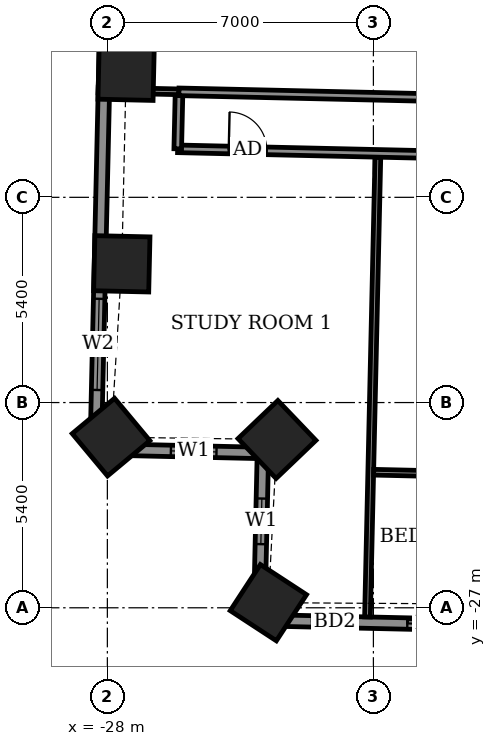
"""IFC4 building model, lengths in metres.
Left out: names, types, materials, properties, quantities, classifications, styles, units other than length and angle.
Written with IfcOpenShell. Run it as: python <this file> out.ifc"""

import sys

from ifc_helpers import new_model, si_unit, direction, frame, frame_2d, origin, origin_2d, place, context, subcontext, project, spatial, rectangle, extrude, element, fill, save


model = new_model("IFC4")
c1 = context("Model", 3, precision=1e-05, world=origin(), true_north=direction((0.0, 1.0)))
c2 = subcontext(c1, "Body", "Model", "MODEL_VIEW")
j1 = project(units=[si_unit("LENGTHUNIT", "METRE"), si_unit("PLANEANGLEUNIT", "RADIAN")], contexts=[c1])
p1 = place(None, origin())
s1 = spatial("IfcSite", under=j1, at=p1, CompositionType="ELEMENT")
p2 = place(p1, origin())
s2 = spatial("IfcBuilding", under=s1, at=p2, CompositionType="ELEMENT")
p3 = place(p2, frame((0.0, 0.0, 71.1)))
s3 = spatial("IfcBuildingStorey", under=s2, at=p3, CompositionType="ELEMENT", Elevation=71.1)
for number, where, z_axis, x_axis in (
    (1, (-27.506, -12.909, -0.55), (0.0, 0.0, 1.0), (-0.023, -1.0, 0.0)),
    (2, (-27.62, -17.949, -0.55), (0.0, 0.0, 1.0), (-0.023, -1.0, 0.0)),
    (3, (-27.903, -22.51, -0.55), (0.0, 0.0, 1.0), (0.64, -0.768, 0.0)),
    (4, (-23.537, -22.572, -0.55), (0.0, 0.0, 1.0), (0.691, -0.723, 0.0)),
    (5, (-23.763, -26.865, -0.55), (0.0, 0.0, 1.0), (0.837, -0.547, 0.0)),
):
    element("IfcColumn", number, at=place(p3, frame(where, z_axis=z_axis, x_axis=x_axis)), inside=s3, PredefinedType="COLUMN", context=c2, shape_type="SweptSolid", body=[
        extrude(rectangle(XDim=1.45, YDim=1.45, at=origin_2d()), origin(), (0.0, 0.0, 1.0), 3.6),
    ])
p4 = place(p3, frame((-27.965, -7.802, 0.0), z_axis=(0.0, 0.0, 1.0), x_axis=(-0.02267786199, -0.999742824218, 0.0)))
e6 = element("IfcWall", 6, at=p4, inside=s3, PredefinedType="SOLIDWALL", context=c2, shape_type="SweptSolid", body=[
    extrude(rectangle(XDim=15.029, YDim=0.3, at=frame_2d((7.514, 0.0))), origin(), (0.0, 0.0, 1.0), 3.05),
])
p5 = place(p4, frame((1.826, 0.0, 0.0)))
e7 = element("IfcOpeningElement", 7, at=p5, cuts=e6, PredefinedType="OPENING", context=c2, shape_type="SweptSolid", body=[
    extrude(rectangle(XDim=1.5, YDim=2.4, at=frame_2d((0.75, 1.2))), frame((0.0, 0.16, 0.0), z_axis=(0.0, -1.0, 0.0), x_axis=(1.0, 0.0, 0.0)), (0.0, 0.0, 1.0), 0.32),
])
p6 = place(p4, frame((11.071, 0.0, 0.9)))
e8 = element("IfcOpeningElement", 8, at=p6, cuts=e6, PredefinedType="OPENING", context=c2, shape_type="SweptSolid", body=[
    extrude(rectangle(XDim=2.4, YDim=1.5, at=frame_2d((1.2, 0.75))), frame((0.0, 0.16, 0.0), z_axis=(0.0, -1.0, 0.0), x_axis=(1.0, 0.0, 0.0)), (0.0, 0.0, 1.0), 0.32),
])
p7 = place(p3, frame((-28.306, -22.827, 0.0), z_axis=(0.0, 0.0, 1.0), x_axis=(0.999741204967, -0.022749133868, 0.0)))
e9 = element("IfcWall", 9, at=p7, inside=s3, PredefinedType="SOLIDWALL", context=c2, shape_type="SweptSolid", body=[
    extrude(rectangle(XDim=4.4, YDim=0.3, at=frame_2d((2.2, 0.0))), origin(), (0.0, 0.0, 1.0), 2.55),
])
p8 = place(p7, frame((1.978, 0.0, 0.9)))
e10 = element("IfcOpeningElement", 10, at=p8, cuts=e9, PredefinedType="OPENING", context=c2, shape_type="SweptSolid", body=[
    extrude(rectangle(XDim=1.2, YDim=1.5, at=frame_2d((0.6, 0.75))), frame((0.0, 0.16, 0.0), z_axis=(0.0, -1.0, 0.0), x_axis=(1.0, 0.0, 0.0)), (0.0, 0.0, 1.0), 0.32),
])
p9 = place(p3, frame((-23.901, -22.633, 0.0), z_axis=(0.0, 0.0, 1.0), x_axis=(-0.022624526802, -0.999744032634, 0.0)))
e11 = element("IfcWall", 11, at=p9, inside=s3, PredefinedType="SOLIDWALL", context=c2, shape_type="SweptSolid", body=[
    extrude(rectangle(XDim=4.694, YDim=0.3, at=frame_2d((2.347, 0.0))), origin(), (0.0, 0.0, 1.0), 2.55),
])
p10 = place(p9, frame((1.493, 0.0, 0.9)))
e12 = element("IfcOpeningElement", 12, at=p10, cuts=e11, PredefinedType="OPENING", context=c2, shape_type="SweptSolid", body=[
    extrude(rectangle(XDim=1.2, YDim=1.5, at=frame_2d((0.6, 0.75))), frame((0.0, 0.16, 0.0), z_axis=(0.0, -1.0, 0.0), x_axis=(1.0, 0.0, 0.0)), (0.0, 0.0, 1.0), 0.32),
])
p11 = place(p3, frame((-24.007, -27.326, 0.0), z_axis=(0.0, 0.0, 1.0), x_axis=(0.999742536491, -0.022690542744, 0.0)))
e13 = element("IfcWall", 13, at=p11, inside=s3, PredefinedType="SOLIDWALL", context=c2, shape_type="SweptSolid", body=[
    extrude(rectangle(XDim=49.236, YDim=0.3, at=frame_2d((24.618, 0.0))), origin(), (0.0, 0.0, 1.0), 3.05),
])
p12 = place(p11, frame((1.391, 0.0, 0.0)))
e14 = element("IfcOpeningElement", 14, at=p12, cuts=e13, PredefinedType="OPENING", context=c2, shape_type="SweptSolid", body=[
    extrude(rectangle(XDim=1.2, YDim=2.4, at=frame_2d((0.6, 1.2))), frame((0.0, 0.16, 0.0), z_axis=(0.0, -1.0, 0.0), x_axis=(1.0, 0.0, 0.0)), (0.0, 0.0, 1.0), 0.32),
])
p13 = place(p11, frame((3.901, 0.0, 0.0)))
e15 = element("IfcOpeningElement", 15, at=p13, cuts=e13, PredefinedType="OPENING", context=c2, shape_type="SweptSolid", body=[
    extrude(rectangle(XDim=1.5, YDim=2.4, at=frame_2d((0.75, 1.2))), frame((0.0, 0.16, 0.0), z_axis=(0.0, -1.0, 0.0), x_axis=(1.0, 0.0, 0.0)), (0.0, 0.0, 1.0), 0.32),
])
p14 = place(p11, frame((9.1, 0.0, 0.0)))
e16 = element("IfcOpeningElement", 16, at=p14, cuts=e13, PredefinedType="OPENING", context=c2, shape_type="SweptSolid", body=[
    extrude(rectangle(XDim=1.5, YDim=2.4, at=frame_2d((0.75, 1.2))), frame((0.0, 0.16, 0.0), z_axis=(0.0, -1.0, 0.0), x_axis=(1.0, 0.0, 0.0)), (0.0, 0.0, 1.0), 0.32),
])
p15 = place(p11, frame((14.889, 0.0, 0.0)))
e17 = element("IfcOpeningElement", 17, at=p15, cuts=e13, PredefinedType="OPENING", context=c2, shape_type="SweptSolid", body=[
    extrude(rectangle(XDim=1.5, YDim=2.4, at=frame_2d((0.75, 1.2))), frame((0.0, 0.16, 0.0), z_axis=(0.0, -1.0, 0.0), x_axis=(1.0, 0.0, 0.0)), (0.0, 0.0, 1.0), 0.32),
])
p16 = place(p11, frame((17.952, 0.0, 0.0)))
e18 = element("IfcOpeningElement", 18, at=p16, cuts=e13, PredefinedType="OPENING", context=c2, shape_type="SweptSolid", body=[
    extrude(rectangle(XDim=1.5, YDim=2.4, at=frame_2d((0.75, 1.2))), frame((0.0, 0.16, 0.0), z_axis=(0.0, -1.0, 0.0), x_axis=(1.0, 0.0, 0.0)), (0.0, 0.0, 1.0), 0.32),
])
p17 = place(p11, frame((22.878, 0.0, 0.0)))
e19 = element("IfcOpeningElement", 19, at=p17, cuts=e13, PredefinedType="OPENING", context=c2, shape_type="SweptSolid", body=[
    extrude(rectangle(XDim=1.5, YDim=2.4, at=frame_2d((0.75, 1.2))), frame((0.0, 0.16, 0.0), z_axis=(0.0, -1.0, 0.0), x_axis=(1.0, 0.0, 0.0)), (0.0, 0.0, 1.0), 0.32),
])
p18 = place(p11, frame((26.091, 0.0, 0.0)))
e20 = element("IfcOpeningElement", 20, at=p18, cuts=e13, PredefinedType="OPENING", context=c2, shape_type="SweptSolid", body=[
    extrude(rectangle(XDim=1.2, YDim=2.4, at=frame_2d((0.6, 1.2))), frame((0.0, 0.16, 0.0), z_axis=(0.0, -1.0, 0.0), x_axis=(1.0, 0.0, 0.0)), (0.0, 0.0, 1.0), 0.32),
])
p19 = place(p11, frame((31.754, 0.0, 0.0)))
e21 = element("IfcOpeningElement", 21, at=p19, cuts=e13, PredefinedType="OPENING", context=c2, shape_type="SweptSolid", body=[
    extrude(rectangle(XDim=1.5, YDim=2.4, at=frame_2d((0.75, 1.2))), frame((0.0, 0.16, 0.0), z_axis=(0.0, -1.0, 0.0), x_axis=(1.0, 0.0, 0.0)), (0.0, 0.0, 1.0), 0.32),
])
p20 = place(p11, frame((36.854, 0.0, 0.0)))
e22 = element("IfcOpeningElement", 22, at=p20, cuts=e13, PredefinedType="OPENING", context=c2, shape_type="SweptSolid", body=[
    extrude(rectangle(XDim=1.5, YDim=2.4, at=frame_2d((0.75, 1.2))), frame((0.0, 0.16, 0.0), z_axis=(0.0, -1.0, 0.0), x_axis=(1.0, 0.0, 0.0)), (0.0, 0.0, 1.0), 0.32),
])
p21 = place(p11, frame((39.917, 0.0, 0.0)))
e23 = element("IfcOpeningElement", 23, at=p21, cuts=e13, PredefinedType="OPENING", context=c2, shape_type="SweptSolid", body=[
    extrude(rectangle(XDim=1.5, YDim=2.4, at=frame_2d((0.75, 1.2))), frame((0.0, 0.16, 0.0), z_axis=(0.0, -1.0, 0.0), x_axis=(1.0, 0.0, 0.0)), (0.0, 0.0, 1.0), 0.32),
])
p22 = place(p11, frame((45.072, 0.0, 0.9)))
e24 = element("IfcOpeningElement", 24, at=p22, cuts=e13, PredefinedType="OPENING", context=c2, shape_type="SweptSolid", body=[
    extrude(rectangle(XDim=2.4, YDim=1.5, at=frame_2d((1.2, 0.75))), frame((0.0, 0.16, 0.0), z_axis=(0.0, -1.0, 0.0), x_axis=(1.0, 0.0, 0.0)), (0.0, 0.0, 1.0), 0.32),
])
p23 = place(p3, frame((-21.156, -27.241, 0.0), z_axis=(0.0, 0.0, 1.0), x_axis=(0.022636621344, 0.999743758857, 0.0)))
e25 = element("IfcWall", 25, at=p23, inside=s3, PredefinedType="PARTITIONING", context=c2, shape_type="SweptSolid", body=[
    extrude(rectangle(XDim=12.101, YDim=0.15, at=frame_2d((6.051, 0.0))), origin(), (0.0, 0.0, 1.0), 2.55),
])
p24 = place(p3, frame((-20.993, -23.433, 0.0), z_axis=(0.0, 0.0, 1.0), x_axis=(0.999740260747, -0.02279059109, 0.0)))
e26 = element("IfcWall", 26, at=p24, inside=s3, PredefinedType="PARTITIONING", context=c2, shape_type="SweptSolid", body=[
    extrude(rectangle(XDim=2.324, YDim=0.15, at=frame_2d((1.162, 0.0))), origin(), (0.0, 0.0, 1.0), 3.05),
])
p25 = place(p3, frame((-26.151, -14.924, 0.0), z_axis=(0.0, 0.0, 1.0), x_axis=(0.999742750999, -0.022681089575, 0.0)))
e27 = element("IfcWall", 27, at=p25, inside=s3, PredefinedType="PARTITIONING", context=c2, shape_type="SweptSolid", body=[
    extrude(rectangle(XDim=54.886, YDim=0.2, at=frame_2d((27.443, 0.0))), origin(), (0.0, 0.0, 1.0), 3.05),
])
p26 = place(p25, frame((1.345, 0.0, 0.0)))
e28 = element("IfcOpeningElement", 28, at=p26, cuts=e27, PredefinedType="OPENING", context=c2, shape_type="SweptSolid", body=[
    extrude(rectangle(XDim=1.0, YDim=2.1, at=frame_2d((0.5, 1.05))), frame((0.0, 0.11, 0.0), z_axis=(0.0, -1.0, 0.0), x_axis=(1.0, 0.0, 0.0)), (0.0, 0.0, 1.0), 0.22),
])
p27 = place(p25, frame((8.35, 0.0, 0.0)))
e29 = element("IfcOpeningElement", 29, at=p27, cuts=e27, PredefinedType="OPENING", context=c2, shape_type="SweptSolid", body=[
    extrude(rectangle(XDim=0.9, YDim=2.1, at=frame_2d((0.45, 1.05))), frame((0.0, 0.11, 0.0), z_axis=(0.0, -1.0, 0.0), x_axis=(1.0, 0.0, 0.0)), (0.0, 0.0, 1.0), 0.22),
])
p28 = place(p25, frame((10.625, 0.0, 0.0)))
e30 = element("IfcOpeningElement", 30, at=p28, cuts=e27, PredefinedType="OPENING", context=c2, shape_type="SweptSolid", body=[
    extrude(rectangle(XDim=0.9, YDim=2.1, at=frame_2d((0.45, 1.05))), frame((0.0, 0.11, 0.0), z_axis=(0.0, -1.0, 0.0), x_axis=(1.0, 0.0, 0.0)), (0.0, 0.0, 1.0), 0.22),
])
p29 = place(p25, frame((17.675, 0.0, 0.0)))
e31 = element("IfcOpeningElement", 31, at=p29, cuts=e27, PredefinedType="OPENING", context=c2, shape_type="SweptSolid", body=[
    extrude(rectangle(XDim=0.9, YDim=2.1, at=frame_2d((0.45, 1.05))), frame((0.0, 0.11, 0.0), z_axis=(0.0, -1.0, 0.0), x_axis=(1.0, 0.0, 0.0)), (0.0, 0.0, 1.0), 0.22),
])
p30 = place(p25, frame((19.725, 0.0, 0.0)))
e32 = element("IfcOpeningElement", 32, at=p30, cuts=e27, PredefinedType="OPENING", context=c2, shape_type="SweptSolid", body=[
    extrude(rectangle(XDim=0.9, YDim=2.1, at=frame_2d((0.45, 1.05))), frame((0.0, 0.11, 0.0), z_axis=(0.0, -1.0, 0.0), x_axis=(1.0, 0.0, 0.0)), (0.0, 0.0, 1.0), 0.22),
])
p31 = place(p25, frame((26.575, 0.0, 0.0)))
e33 = element("IfcOpeningElement", 33, at=p31, cuts=e27, PredefinedType="OPENING", context=c2, shape_type="SweptSolid", body=[
    extrude(rectangle(XDim=0.9, YDim=2.1, at=frame_2d((0.45, 1.05))), frame((0.0, 0.11, 0.0), z_axis=(0.0, -1.0, 0.0), x_axis=(1.0, 0.0, 0.0)), (0.0, 0.0, 1.0), 0.22),
])
p32 = place(p25, frame((28.75, 0.0, 0.0)))
e34 = element("IfcOpeningElement", 34, at=p32, cuts=e27, PredefinedType="OPENING", context=c2, shape_type="SweptSolid", body=[
    extrude(rectangle(XDim=0.9, YDim=2.1, at=frame_2d((0.45, 1.05))), frame((0.0, 0.11, 0.0), z_axis=(0.0, -1.0, 0.0), x_axis=(1.0, 0.0, 0.0)), (0.0, 0.0, 1.0), 0.22),
])
p33 = place(p25, frame((35.875, 0.0, 0.0)))
e35 = element("IfcOpeningElement", 35, at=p33, cuts=e27, PredefinedType="OPENING", context=c2, shape_type="SweptSolid", body=[
    extrude(rectangle(XDim=0.9, YDim=2.1, at=frame_2d((0.45, 1.05))), frame((0.0, 0.11, 0.0), z_axis=(0.0, -1.0, 0.0), x_axis=(1.0, 0.0, 0.0)), (0.0, 0.0, 1.0), 0.22),
])
p34 = place(p25, frame((38.1, 0.0, 0.0)))
e36 = element("IfcOpeningElement", 36, at=p34, cuts=e27, PredefinedType="OPENING", context=c2, shape_type="SweptSolid", body=[
    extrude(rectangle(XDim=0.9, YDim=2.1, at=frame_2d((0.45, 1.05))), frame((0.0, 0.11, 0.0), z_axis=(0.0, -1.0, 0.0), x_axis=(1.0, 0.0, 0.0)), (0.0, 0.0, 1.0), 0.22),
])
p35 = place(p25, frame((45.125, 0.0, 0.0)))
e37 = element("IfcOpeningElement", 37, at=p35, cuts=e27, PredefinedType="OPENING", context=c2, shape_type="SweptSolid", body=[
    extrude(rectangle(XDim=0.9, YDim=2.1, at=frame_2d((0.45, 1.05))), frame((0.0, 0.11, 0.0), z_axis=(0.0, -1.0, 0.0), x_axis=(1.0, 0.0, 0.0)), (0.0, 0.0, 1.0), 0.22),
])
p36 = place(p25, frame((52.618, 0.0, 0.0)))
e38 = element("IfcOpeningElement", 38, at=p36, cuts=e27, PredefinedType="OPENING", context=c2, shape_type="SweptSolid", body=[
    extrude(rectangle(XDim=1.0, YDim=2.1, at=frame_2d((0.5, 1.05))), frame((0.0, 0.11, 0.0), z_axis=(0.0, -1.0, 0.0), x_axis=(1.0, 0.0, 0.0)), (0.0, 0.0, 1.0), 0.22),
])
p37 = place(p25, frame((47.575, 0.0, 0.0)))
e39 = element("IfcOpeningElement", 39, at=p37, cuts=e27, PredefinedType="OPENING", context=c2, shape_type="SweptSolid", body=[
    extrude(rectangle(XDim=0.9, YDim=2.1, at=frame_2d((0.45, 1.05))), frame((0.0, 0.11, 0.0), z_axis=(0.0, -1.0, 0.0), x_axis=(1.0, 0.0, 0.0)), (0.0, 0.0, 1.0), 0.22),
])
p38 = place(p3, frame((-26.148, -14.924, 0.0), z_axis=(0.0, 0.0, 1.0), x_axis=(0.022617910375, 0.999744182344, 0.0)))
e40 = element("IfcWall", 40, at=p38, inside=s3, PredefinedType="PARTITIONING", context=c2, shape_type="SweptSolid", body=[
    extrude(rectangle(XDim=1.5, YDim=0.2, at=frame_2d((0.75, 0.0))), origin(), (0.0, 0.0, 1.0), 3.05),
])
p39 = place(p3, frame((-28.242, -13.376, 0.0), z_axis=(0.0, 0.0, 1.0), x_axis=(0.999743965862, -0.022627477169, 0.0)))
e41 = element("IfcWall", 41, at=p39, inside=s3, PredefinedType="PARTITIONING", context=c2, shape_type="SweptSolid", body=[
    extrude(rectangle(XDim=2.125, YDim=0.15, at=frame_2d((1.063, 0.0))), origin(), (0.0, 0.0, 1.0), 3.05),
])
p40 = place(p3, frame((-26.117, -13.424, 0.0), z_axis=(0.0, 0.0, 1.0), x_axis=(0.999741493133, -0.022736466476, 0.0)))
e42 = element("IfcWall", 42, at=p40, inside=s3, PredefinedType="PARTITIONING", context=c2, shape_type="SweptSolid", body=[
    extrude(rectangle(XDim=8.837, YDim=0.2, at=frame_2d((4.418, 0.0))), origin(), (0.0, 0.0, 1.0), 3.05),
])
p41 = place(p6, origin())
e43 = element("IfcWindow", 43, at=p41, inside=s3, PartitioningType="DOUBLE_PANEL_VERTICAL", PredefinedType="WINDOW", context=c2, shape_type="SweptSolid", body=[
    extrude(rectangle(XDim=2.4, YDim=1.5, at=frame_2d((1.2, 0.75))), frame((0.0, 0.03, 0.0), z_axis=(0.0, -1.0, 0.0), x_axis=(1.0, 0.0, 0.0)), (0.0, 0.0, 1.0), 0.06),
])
fill(e8, e43)
p42 = place(p8, origin())
e44 = element("IfcWindow", 44, at=p42, inside=s3, PartitioningType="SINGLE_PANEL", PredefinedType="WINDOW", context=c2, shape_type="SweptSolid", body=[
    extrude(rectangle(XDim=1.2, YDim=1.5, at=frame_2d((0.6, 0.75))), frame((0.0, 0.03, 0.0), z_axis=(0.0, -1.0, 0.0), x_axis=(1.0, 0.0, 0.0)), (0.0, 0.0, 1.0), 0.06),
])
fill(e10, e44)
p43 = place(p10, origin())
e45 = element("IfcWindow", 45, at=p43, inside=s3, PartitioningType="SINGLE_PANEL", PredefinedType="WINDOW", context=c2, shape_type="SweptSolid", body=[
    extrude(rectangle(XDim=1.2, YDim=1.5, at=frame_2d((0.6, 0.75))), frame((0.0, 0.03, 0.0), z_axis=(0.0, -1.0, 0.0), x_axis=(1.0, 0.0, 0.0)), (0.0, 0.0, 1.0), 0.06),
])
fill(e12, e45)
p44 = place(p12, origin())
e46 = element("IfcDoor", 46, at=p44, inside=s3, OperationType="SLIDING_TO_LEFT", PredefinedType="DOOR", context=c2, shape_type="SweptSolid", body=[
    extrude(rectangle(XDim=1.2, YDim=2.4, at=frame_2d((0.6, 1.2))), frame((0.0, 0.025, 0.0), z_axis=(0.0, -1.0, 0.0), x_axis=(1.0, 0.0, 0.0)), (0.0, 0.0, 1.0), 0.05),
])
fill(e14, e46)
p45 = place(p13, origin())
e47 = element("IfcDoor", 47, at=p45, inside=s3, OperationType="SLIDING_TO_LEFT", PredefinedType="DOOR", context=c2, shape_type="SweptSolid", body=[
    extrude(rectangle(XDim=1.5, YDim=2.4, at=frame_2d((0.75, 1.2))), frame((0.0, 0.025, 0.0), z_axis=(0.0, -1.0, 0.0), x_axis=(1.0, 0.0, 0.0)), (0.0, 0.0, 1.0), 0.05),
])
fill(e15, e47)
p46 = place(p26, origin())
e48 = element("IfcDoor", 48, at=p46, inside=s3, OperationType="SINGLE_SWING_LEFT", PredefinedType="DOOR", context=c2, shape_type="SweptSolid", body=[
    extrude(rectangle(XDim=1.0, YDim=2.1, at=frame_2d((0.5, 1.05))), frame((0.0, 0.025, 0.0), z_axis=(0.0, -1.0, 0.0), x_axis=(1.0, 0.0, 0.0)), (0.0, 0.0, 1.0), 0.05),
])
fill(e28, e48)
save(model, sys.argv[1])
